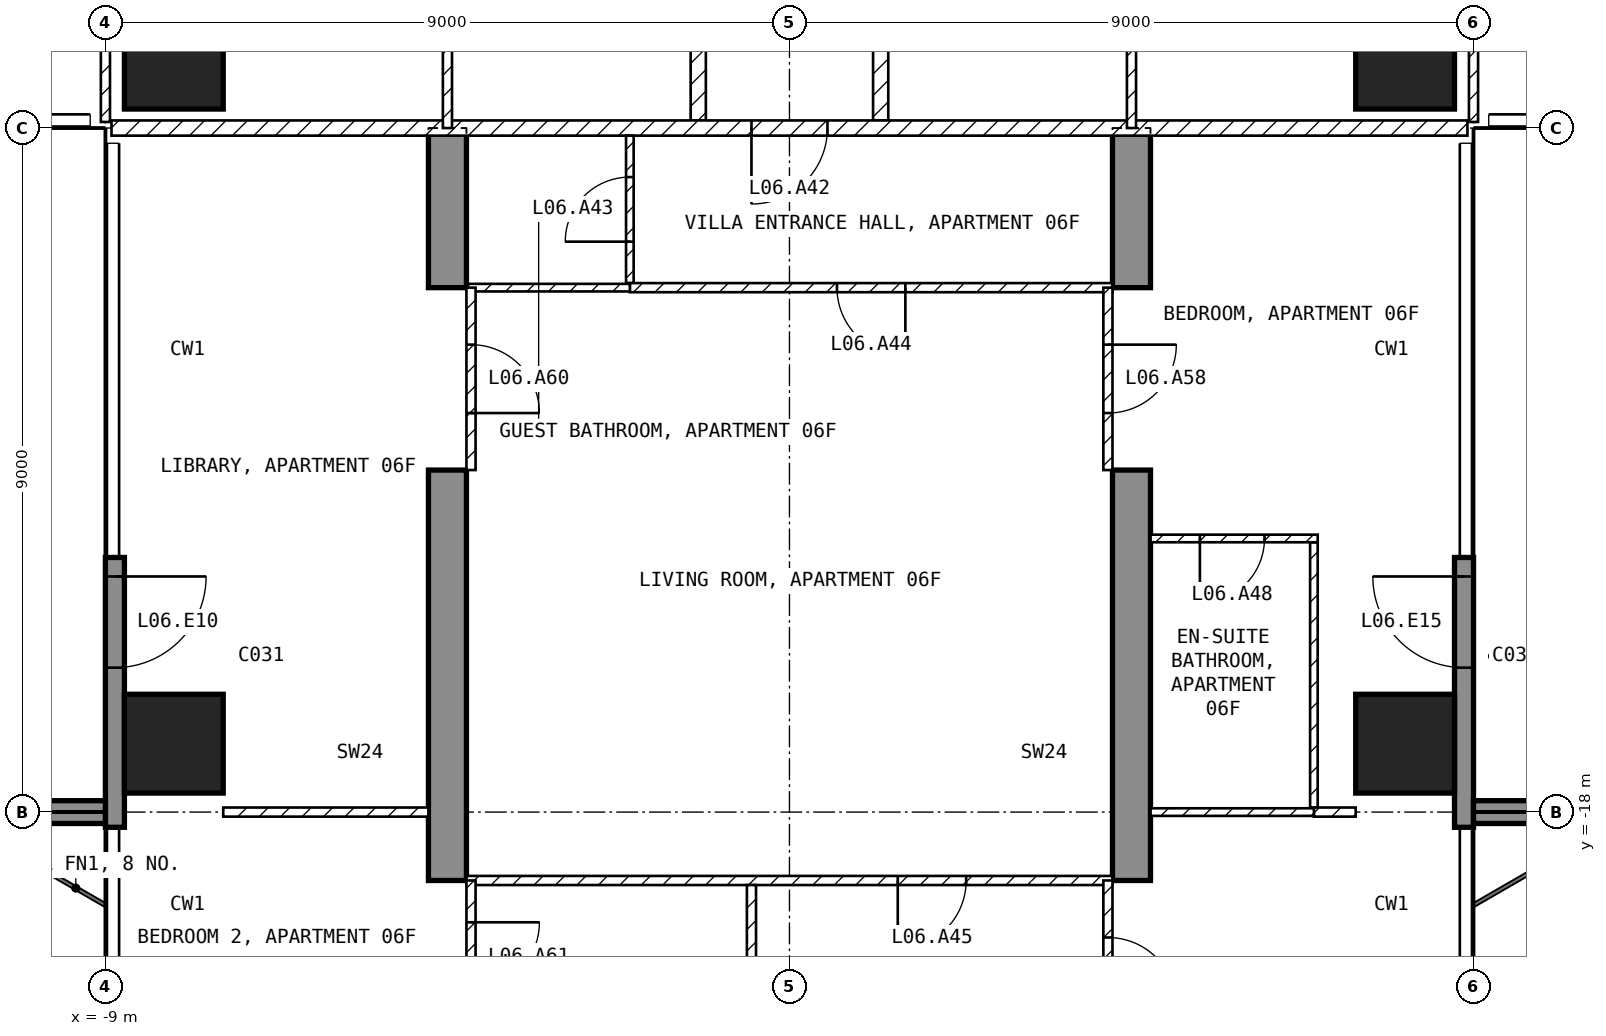
"""IFC4 building model, lengths in metres.
Left out: names, types, materials, properties, quantities, classifications, styles, units other than length and angle.
Written with IfcOpenShell. Run it as: python <this file> out.ifc"""

import sys

from ifc_helpers import new_model, si_unit, direction, frame, frame_2d, origin, origin_2d, place, context, subcontext, project, spatial, polyline, rectangle, outline, extrude, element, fill, save


model = new_model("IFC4")
c1 = context("Model", 3, precision=1e-05, world=origin(), true_north=direction((0.0, 1.0)))
c2 = subcontext(c1, "Body", "Model", "MODEL_VIEW")
j1 = project(units=[si_unit("LENGTHUNIT", "METRE"), si_unit("PLANEANGLEUNIT", "RADIAN")], contexts=[c1])
p1 = place(None, origin())
s1 = spatial("IfcSite", under=j1, at=p1, CompositionType="ELEMENT")
p2 = place(p1, origin())
s2 = spatial("IfcBuilding", under=s1, at=p2, CompositionType="ELEMENT")
p3 = place(p2, frame((0.0, 0.0, 40.0)))
s3 = spatial("IfcBuildingStorey", under=s2, at=p3, CompositionType="ELEMENT", Elevation=40.0)
for number, where, z_axis, x_axis in (
    (1, (-8.1, -17.1, -0.25), (0.0, 0.0, 1.0), (1.0, 0.0, 0.0)),
    (2, (-8.1, -8.1, -0.25), (0.0, 0.0, 1.0), (1.0, 0.0, 0.0)),
    (3, (8.1, -17.1, -0.25), (0.0, 0.0, 1.0), (1.0, 0.0, 0.0)),
    (4, (8.1, -8.1, -0.25), (0.0, 0.0, 1.0), (1.0, 0.0, 0.0)),
):
    element("IfcColumn", number, at=place(p3, frame(where, z_axis=z_axis, x_axis=x_axis)), inside=s3, PredefinedType="COLUMN", context=c2, shape_type="SweptSolid", body=[
        extrude(rectangle(XDim=1.3, YDim=1.3, at=origin_2d()), origin(), (0.0, 0.0, 1.0), 3.5),
    ])
for number, where, z_axis, x_axis in (
    (5, (-4.75, -25.45, -0.25), (1.0, 0.0, 0.0), (0.0, 1.0, 0.0)),
    (6, (4.25, -25.45, -0.25), (1.0, 0.0, 0.0), (0.0, 1.0, 0.0)),
):
    element("IfcWall", number, at=place(p3, frame(where, z_axis=z_axis, x_axis=x_axis)), inside=s3, PredefinedType="SHEAR", context=c2, shape_type="SweptSolid", body=[
        extrude(outline(polyline([(0.0, 0.0), (4.15, 0.0), (4.15, 2.65), (6.55, 2.65), (6.55, 0.0), (11.95, 0.0), (11.95, 2.65), (14.35, 2.65), (14.35, 0.0), (16.45, 0.0), (16.45, 3.5), (0.0, 3.5), (0.0, 0.0)])), origin(), (0.0, 0.0, 1.0), 0.5),
    ])
p4 = place(p3, frame((-8.875, -14.65, 0.0), z_axis=(0.0, 0.0, 1.0), x_axis=(0.0, -1.0, 0.0)))
e7 = element("IfcWall", 7, at=p4, inside=s3, PredefinedType="SOLIDWALL", context=c2, shape_type="SweptSolid", body=[
    extrude(rectangle(XDim=3.55, YDim=0.25, at=frame_2d((1.775, 0.0))), origin(), (0.0, 0.0, 1.0), 3.25),
])
p5 = place(p4, frame((0.25, 0.0, 0.0)))
e8 = element("IfcOpeningElement", 8, at=p5, cuts=e7, PredefinedType="OPENING", context=c2, shape_type="SweptSolid", body=[
    extrude(rectangle(XDim=1.2, YDim=2.4, at=frame_2d((0.6, 1.2))), frame((0.0, 0.135, 0.0), z_axis=(0.0, -1.0, 0.0), x_axis=(1.0, 0.0, 0.0)), (0.0, 0.0, 1.0), 0.27),
])
p6 = place(p3, frame((8.875, -18.2, 0.0), z_axis=(0.0, 0.0, 1.0), x_axis=(0.0, 1.0, 0.0)))
e9 = element("IfcWall", 9, at=p6, inside=s3, PredefinedType="SOLIDWALL", context=c2, shape_type="SweptSolid", body=[
    extrude(rectangle(XDim=3.55, YDim=0.25, at=frame_2d((1.775, 0.0))), origin(), (0.0, 0.0, 1.0), 3.25),
])
p7 = place(p6, frame((2.1, 0.0, 0.0)))
e10 = element("IfcOpeningElement", 10, at=p7, cuts=e9, PredefinedType="OPENING", context=c2, shape_type="SweptSolid", body=[
    extrude(rectangle(XDim=1.2, YDim=2.4, at=frame_2d((0.6, 1.2))), frame((0.0, 0.135, 0.0), z_axis=(0.0, -1.0, 0.0), x_axis=(1.0, 0.0, 0.0)), (0.0, 0.0, 1.0), 0.27),
])
for number, where, z_axis, x_axis in (
    (11, (-9.0, -18.0, 0.0), (0.0, 0.0, 1.0), (-1.0, 0.0, 0.0)),
    (12, (9.0, -18.0, 0.0), (0.0, 0.0, 1.0), (1.0, 0.0, 0.0)),
):
    element("IfcWall", number, at=place(p3, frame(where, z_axis=z_axis, x_axis=x_axis)), inside=s3, PredefinedType="SOLIDWALL", context=c2, shape_type="SweptSolid", body=[
        extrude(rectangle(XDim=2.7, YDim=0.3, at=frame_2d((1.35, 0.0))), origin(), (0.0, 0.0, 1.0), 3.25),
    ])
for number, where, z_axis, x_axis in (
    (13, (1.2, -1.3, 0.0), (0.0, 0.0, 1.0), (0.0, -1.0, 0.0)),
    (14, (-1.2, -8.9, 0.0), (0.0, 0.0, 1.0), (0.0, 1.0, 0.0)),
):
    element("IfcWall", number, at=place(p3, frame(where, z_axis=z_axis, x_axis=x_axis)), inside=s3, PredefinedType="PARTITIONING", context=c2, shape_type="SweptSolid", body=[
        extrude(rectangle(XDim=7.6, YDim=0.2, at=frame_2d((3.8, 0.0))), origin(), (0.0, 0.0, 1.0), 3.25),
    ])
p8 = place(p3, frame((8.92, -9.0, 0.0), z_axis=(0.0, 0.0, 1.0), x_axis=(-1.0, 0.0, 0.0)))
e15 = element("IfcWall", 15, at=p8, inside=s3, PredefinedType="PARTITIONING", context=c2, shape_type="SweptSolid", body=[
    extrude(rectangle(XDim=17.84, YDim=0.2, at=frame_2d((8.92, 0.0))), origin(), (0.0, 0.0, 1.0), 3.25),
])
p9 = place(p8, frame((8.42, 0.0, 0.0)))
e16 = element("IfcOpeningElement", 16, at=p9, cuts=e15, PredefinedType="OPENING", context=c2, shape_type="SweptSolid", body=[
    extrude(rectangle(XDim=1.0, YDim=2.1, at=frame_2d((0.5, 1.05))), frame((0.0, 0.11, 0.0), z_axis=(0.0, -1.0, 0.0), x_axis=(1.0, 0.0, 0.0)), (0.0, 0.0, 1.0), 0.22),
])
p10 = place(p3, frame((9.0, -8.92, 0.0), z_axis=(0.0, 0.0, 1.0), x_axis=(0.0, 1.0, 0.0)))
e17 = element("IfcWall", 17, at=p10, inside=s3, PredefinedType="PARTITIONING", context=c2, shape_type="SweptSolid", body=[
    extrude(rectangle(XDim=7.62, YDim=0.12, at=frame_2d((3.81, 0.0))), origin(), (0.0, 0.0, 1.0), 3.25),
])
p11 = place(p10, frame((2.67, 0.0, 0.0)))
e18 = element("IfcOpeningElement", 18, at=p11, cuts=e17, PredefinedType="OPENING", context=c2, shape_type="SweptSolid", body=[
    extrude(rectangle(XDim=0.9, YDim=2.1, at=frame_2d((0.45, 1.05))), frame((0.0, 0.07, 0.0), z_axis=(0.0, -1.0, 0.0), x_axis=(1.0, 0.0, 0.0)), (0.0, 0.0, 1.0), 0.14),
])
p12 = place(p3, frame((4.5, -9.0, 0.0), z_axis=(0.0, 0.0, 1.0), x_axis=(0.0, 1.0, 0.0)))
e19 = element("IfcWall", 19, at=p12, inside=s3, PredefinedType="PARTITIONING", context=c2, shape_type="SweptSolid", body=[
    extrude(rectangle(XDim=4.68, YDim=0.12, at=frame_2d((2.34, 0.0))), origin(), (0.0, 0.0, 1.0), 3.25),
])
p13 = place(p12, frame((1.89, 0.0, 0.0)))
e20 = element("IfcOpeningElement", 20, at=p13, cuts=e19, PredefinedType="OPENING", context=c2, shape_type="SweptSolid", body=[
    extrude(rectangle(XDim=0.9, YDim=2.1, at=frame_2d((0.45, 1.05))), frame((0.0, 0.07, 0.0), z_axis=(0.0, -1.0, 0.0), x_axis=(1.0, 0.0, 0.0)), (0.0, 0.0, 1.0), 0.14),
])
p14 = place(p3, frame((-9.0, -1.3, 0.0), z_axis=(0.0, 0.0, 1.0), x_axis=(0.0, -1.0, 0.0)))
e21 = element("IfcWall", 21, at=p14, inside=s3, PredefinedType="PARTITIONING", context=c2, shape_type="SweptSolid", body=[
    extrude(rectangle(XDim=7.62, YDim=0.12, at=frame_2d((3.81, 0.0))), origin(), (0.0, 0.0, 1.0), 3.25),
])
p15 = place(p14, frame((1.15, 0.0, 0.0)))
e22 = element("IfcOpeningElement", 22, at=p15, cuts=e21, PredefinedType="OPENING", context=c2, shape_type="SweptSolid", body=[
    extrude(rectangle(XDim=0.9, YDim=2.1, at=frame_2d((0.45, 1.05))), frame((0.0, 0.07, 0.0), z_axis=(0.0, -1.0, 0.0), x_axis=(1.0, 0.0, 0.0)), (0.0, 0.0, 1.0), 0.14),
])
p16 = place(p3, frame((-4.5, -4.32, 0.0), z_axis=(0.0, 0.0, 1.0), x_axis=(0.0, -1.0, 0.0)))
e23 = element("IfcWall", 23, at=p16, inside=s3, PredefinedType="PARTITIONING", context=c2, shape_type="SweptSolid", body=[
    extrude(rectangle(XDim=4.68, YDim=0.12, at=frame_2d((2.34, 0.0))), origin(), (0.0, 0.0, 1.0), 3.25),
])
p17 = place(p16, frame((1.89, 0.0, 0.0)))
e24 = element("IfcOpeningElement", 24, at=p17, cuts=e23, PredefinedType="OPENING", context=c2, shape_type="SweptSolid", body=[
    extrude(rectangle(XDim=0.9, YDim=2.1, at=frame_2d((0.45, 1.05))), frame((0.0, 0.07, 0.0), z_axis=(0.0, -1.0, 0.0), x_axis=(1.0, 0.0, 0.0)), (0.0, 0.0, 1.0), 0.14),
])
p18 = place(p3, frame((-2.1, -11.04, 0.0), z_axis=(0.0, 0.0, 1.0), x_axis=(0.0, 1.0, 0.0)))
e25 = element("IfcWall", 25, at=p18, inside=s3, PredefinedType="PARTITIONING", context=c2, shape_type="SweptSolid", body=[
    extrude(rectangle(XDim=1.94, YDim=0.1, at=frame_2d((0.97, 0.0))), origin(), (0.0, 0.0, 1.0), 3.25),
])
p19 = place(p18, frame((0.545, 0.0, 0.0)))
e26 = element("IfcOpeningElement", 26, at=p19, cuts=e25, PredefinedType="OPENING", context=c2, shape_type="SweptSolid", body=[
    extrude(rectangle(XDim=0.85, YDim=2.1, at=frame_2d((0.425, 1.05))), frame((0.0, 0.06, 0.0), z_axis=(0.0, -1.0, 0.0), x_axis=(1.0, 0.0, 0.0)), (0.0, 0.0, 1.0), 0.12),
])
p20 = place(p3, frame((4.25, -11.1, 0.0), z_axis=(0.0, 0.0, 1.0), x_axis=(-1.0, 0.0, 0.0)))
e27 = element("IfcWall", 27, at=p20, inside=s3, PredefinedType="PARTITIONING", context=c2, shape_type="SweptSolid", body=[
    extrude(rectangle(XDim=6.35, YDim=0.12, at=frame_2d((3.175, 0.0))), origin(), (0.0, 0.0, 1.0), 3.25),
])
p21 = place(p20, frame((2.725, 0.0, 0.0)))
e28 = element("IfcOpeningElement", 28, at=p21, cuts=e27, PredefinedType="OPENING", context=c2, shape_type="SweptSolid", body=[
    extrude(rectangle(XDim=0.9, YDim=2.1, at=frame_2d((0.45, 1.05))), frame((0.0, 0.07, 0.0), z_axis=(0.0, -1.0, 0.0), x_axis=(1.0, 0.0, 0.0)), (0.0, 0.0, 1.0), 0.14),
])
p22 = place(p3, frame((-2.1, -11.1, 0.0), z_axis=(0.0, 0.0, 1.0), x_axis=(-1.0, 0.0, 0.0)))
e29 = element("IfcWall", 29, at=p22, inside=s3, PredefinedType="PARTITIONING", context=c2, shape_type="SweptSolid", body=[
    extrude(rectangle(XDim=2.15, YDim=0.1, at=frame_2d((1.075, 0.0))), origin(), (0.0, 0.0, 1.0), 3.25),
])
p23 = place(p3, frame((4.25, -18.9, 0.0), z_axis=(0.0, 0.0, 1.0), x_axis=(-1.0, 0.0, 0.0)))
e30 = element("IfcWall", 30, at=p23, inside=s3, PredefinedType="PARTITIONING", context=c2, shape_type="SweptSolid", body=[
    extrude(rectangle(XDim=8.5, YDim=0.12, at=frame_2d((4.25, 0.0))), origin(), (0.0, 0.0, 1.0), 3.25),
])
p24 = place(p23, frame((1.925, 0.0, 0.0)))
e31 = element("IfcOpeningElement", 31, at=p24, cuts=e30, PredefinedType="OPENING", context=c2, shape_type="SweptSolid", body=[
    extrude(rectangle(XDim=0.9, YDim=2.1, at=frame_2d((0.45, 1.05))), frame((0.0, 0.07, 0.0), z_axis=(0.0, -1.0, 0.0), x_axis=(1.0, 0.0, 0.0)), (0.0, 0.0, 1.0), 0.14),
])
p25 = place(p3, frame((-0.5, -23.34, 0.0), z_axis=(0.0, 0.0, 1.0), x_axis=(0.0, 1.0, 0.0)))
e32 = element("IfcWall", 32, at=p25, inside=s3, PredefinedType="PARTITIONING", context=c2, shape_type="SweptSolid", body=[
    extrude(rectangle(XDim=4.38, YDim=0.12, at=frame_2d((2.19, 0.0))), origin(), (0.0, 0.0, 1.0), 3.25),
])
p26 = place(p25, frame((1.74, 0.0, 0.0)))
e33 = element("IfcOpeningElement", 33, at=p26, cuts=e32, PredefinedType="OPENING", context=c2, shape_type="SweptSolid", body=[
    extrude(rectangle(XDim=0.9, YDim=2.1, at=frame_2d((0.45, 1.05))), frame((0.0, 0.07, 0.0), z_axis=(0.0, -1.0, 0.0), x_axis=(1.0, 0.0, 0.0)), (0.0, 0.0, 1.0), 0.14),
])
p27 = place(p3, frame((6.9, -17.94, 0.0), z_axis=(0.0, 0.0, 1.0), x_axis=(0.0, 1.0, 0.0)))
e34 = element("IfcWall", 34, at=p27, inside=s3, PredefinedType="PARTITIONING", context=c2, shape_type="SweptSolid", body=[
    extrude(rectangle(XDim=3.49, YDim=0.1, at=frame_2d((1.745, 0.0))), origin(), (0.0, 0.0, 1.0), 3.25),
])
p28 = place(p3, frame((6.95, -14.4, 0.0), z_axis=(0.0, 0.0, 1.0), x_axis=(-1.0, 0.0, 0.0)))
e35 = element("IfcWall", 35, at=p28, inside=s3, PredefinedType="PARTITIONING", context=c2, shape_type="SweptSolid", body=[
    extrude(rectangle(XDim=2.2, YDim=0.1, at=frame_2d((1.1, 0.0))), origin(), (0.0, 0.0, 1.0), 3.25),
])
p29 = place(p28, frame((0.7, 0.0, 0.0)))
e36 = element("IfcOpeningElement", 36, at=p29, cuts=e35, PredefinedType="OPENING", context=c2, shape_type="SweptSolid", body=[
    extrude(rectangle(XDim=0.85, YDim=2.1, at=frame_2d((0.425, 1.05))), frame((0.0, 0.06, 0.0), z_axis=(0.0, -1.0, 0.0), x_axis=(1.0, 0.0, 0.0)), (0.0, 0.0, 1.0), 0.12),
])
p30 = place(p3, frame((7.45, -18.0, 0.0), z_axis=(0.0, 0.0, 1.0), x_axis=(-1.0, 0.0, 0.0)))
e37 = element("IfcWall", 37, at=p30, inside=s3, PredefinedType="PARTITIONING", context=c2, shape_type="SweptSolid", body=[
    extrude(rectangle(XDim=0.55, YDim=0.12, at=frame_2d((0.275, 0.0))), origin(), (0.0, 0.0, 1.0), 3.25),
])
p31 = place(p3, frame((6.9, -18.0, 0.0), z_axis=(0.0, 0.0, 1.0), x_axis=(-1.0, 0.0, 0.0)))
e38 = element("IfcWall", 38, at=p31, inside=s3, PredefinedType="PARTITIONING", context=c2, shape_type="SweptSolid", body=[
    extrude(rectangle(XDim=2.15, YDim=0.1, at=frame_2d((1.075, 0.0))), origin(), (0.0, 0.0, 1.0), 3.25),
])
p32 = place(p3, frame((-4.75, -18.0, 0.0), z_axis=(0.0, 0.0, 1.0), x_axis=(-1.0, 0.0, 0.0)))
e39 = element("IfcWall", 39, at=p32, inside=s3, PredefinedType="PARTITIONING", context=c2, shape_type="SweptSolid", body=[
    extrude(rectangle(XDim=2.7, YDim=0.12, at=frame_2d((1.35, 0.0))), origin(), (0.0, 0.0, 1.0), 3.25),
])
p33 = place(p3, frame((4.19, -11.1, 0.0), z_axis=(0.0, 0.0, 1.0), x_axis=(0.0, -1.0, 0.0)))
e40 = element("IfcWall", 40, at=p33, inside=s3, PredefinedType="PARTITIONING", context=c2, shape_type="SweptSolid", body=[
    extrude(rectangle(XDim=2.4, YDim=0.12, at=frame_2d((1.2, 0.0))), origin(), (0.0, 0.0, 1.0), 2.4),
])
p34 = place(p33, frame((0.75, 0.0, 0.0)))
e41 = element("IfcOpeningElement", 41, at=p34, cuts=e40, PredefinedType="OPENING", context=c2, shape_type="SweptSolid", body=[
    extrude(rectangle(XDim=0.9, YDim=2.1, at=frame_2d((0.45, 1.05))), frame((0.0, 0.07, 0.0), z_axis=(0.0, -1.0, 0.0), x_axis=(1.0, 0.0, 0.0)), (0.0, 0.0, 1.0), 0.14),
])
p35 = place(p3, frame((4.19, -18.9, 0.0), z_axis=(0.0, 0.0, 1.0), x_axis=(0.0, -1.0, 0.0)))
e42 = element("IfcWall", 42, at=p35, inside=s3, PredefinedType="PARTITIONING", context=c2, shape_type="SweptSolid", body=[
    extrude(rectangle(XDim=2.4, YDim=0.12, at=frame_2d((1.2, 0.0))), origin(), (0.0, 0.0, 1.0), 2.4),
])
p36 = place(p35, frame((0.75, 0.0, 0.0)))
e43 = element("IfcOpeningElement", 43, at=p36, cuts=e42, PredefinedType="OPENING", context=c2, shape_type="SweptSolid", body=[
    extrude(rectangle(XDim=0.9, YDim=2.1, at=frame_2d((0.45, 1.05))), frame((0.0, 0.07, 0.0), z_axis=(0.0, -1.0, 0.0), x_axis=(1.0, 0.0, 0.0)), (0.0, 0.0, 1.0), 0.14),
])
p37 = place(p3, frame((-4.19, -11.1, 0.0), z_axis=(0.0, 0.0, 1.0), x_axis=(0.0, -1.0, 0.0)))
e44 = element("IfcWall", 44, at=p37, inside=s3, PredefinedType="PARTITIONING", context=c2, shape_type="SweptSolid", body=[
    extrude(rectangle(XDim=2.4, YDim=0.12, at=frame_2d((1.2, 0.0))), origin(), (0.0, 0.0, 1.0), 2.4),
])
p38 = place(p37, frame((0.75, 0.0, 0.0)))
e45 = element("IfcOpeningElement", 45, at=p38, cuts=e44, PredefinedType="OPENING", context=c2, shape_type="SweptSolid", body=[
    extrude(rectangle(XDim=0.9, YDim=2.1, at=frame_2d((0.45, 1.05))), frame((0.0, 0.07, 0.0), z_axis=(0.0, -1.0, 0.0), x_axis=(1.0, 0.0, 0.0)), (0.0, 0.0, 1.0), 0.14),
])
p39 = place(p3, frame((-4.19, -18.9, 0.0), z_axis=(0.0, 0.0, 1.0), x_axis=(0.0, -1.0, 0.0)))
e46 = element("IfcWall", 46, at=p39, inside=s3, PredefinedType="PARTITIONING", context=c2, shape_type="SweptSolid", body=[
    extrude(rectangle(XDim=2.4, YDim=0.12, at=frame_2d((1.2, 0.0))), origin(), (0.0, 0.0, 1.0), 2.4),
])
p40 = place(p39, frame((0.55, 0.0, 0.0)))
e47 = element("IfcOpeningElement", 47, at=p40, cuts=e46, PredefinedType="OPENING", context=c2, shape_type="SweptSolid", body=[
    extrude(rectangle(XDim=0.9, YDim=2.1, at=frame_2d((0.45, 1.05))), frame((0.0, 0.07, 0.0), z_axis=(0.0, -1.0, 0.0), x_axis=(1.0, 0.0, 0.0)), (0.0, 0.0, 1.0), 0.14),
])
p41 = place(p5, origin())
e48 = element("IfcDoor", 48, at=p41, inside=s3, OperationType="SINGLE_SWING_LEFT", PredefinedType="DOOR", context=c2, shape_type="SweptSolid", body=[
    extrude(rectangle(XDim=1.2, YDim=2.4, at=frame_2d((0.6, 1.2))), frame((0.0, 0.025, 0.0), z_axis=(0.0, -1.0, 0.0), x_axis=(1.0, 0.0, 0.0)), (0.0, 0.0, 1.0), 0.05),
])
fill(e8, e48)
p42 = place(p7, origin())
e49 = element("IfcDoor", 49, at=p42, inside=s3, OperationType="SINGLE_SWING_RIGHT", PredefinedType="DOOR", context=c2, shape_type="SweptSolid", body=[
    extrude(rectangle(XDim=1.2, YDim=2.4, at=frame_2d((0.6, 1.2))), frame((0.0, 0.025, 0.0), z_axis=(0.0, -1.0, 0.0), x_axis=(1.0, 0.0, 0.0)), (0.0, 0.0, 1.0), 0.05),
])
fill(e10, e49)
p43 = place(p9, origin())
e50 = element("IfcDoor", 50, at=p43, inside=s3, OperationType="SINGLE_SWING_RIGHT", PredefinedType="DOOR", context=c2, shape_type="SweptSolid", body=[
    extrude(rectangle(XDim=1.0, YDim=2.1, at=frame_2d((0.5, 1.05))), frame((0.0, 0.025, 0.0), z_axis=(0.0, -1.0, 0.0), x_axis=(1.0, 0.0, 0.0)), (0.0, 0.0, 1.0), 0.05),
])
fill(e16, e50)
p44 = place(p19, origin())
e51 = element("IfcDoor", 51, at=p44, inside=s3, OperationType="SINGLE_SWING_LEFT", PredefinedType="DOOR", context=c2, shape_type="SweptSolid", body=[
    extrude(rectangle(XDim=0.85, YDim=2.1, at=frame_2d((0.425, 1.05))), frame((0.0, 0.025, 0.0), z_axis=(0.0, -1.0, 0.0), x_axis=(1.0, 0.0, 0.0)), (0.0, 0.0, 1.0), 0.05),
])
fill(e26, e51)
p45 = place(p21, origin())
e52 = element("IfcDoor", 52, at=p45, inside=s3, OperationType="SINGLE_SWING_LEFT", PredefinedType="DOOR", context=c2, shape_type="SweptSolid", body=[
    extrude(rectangle(XDim=0.9, YDim=2.1, at=frame_2d((0.45, 1.05))), frame((0.0, 0.025, 0.0), z_axis=(0.0, -1.0, 0.0), x_axis=(1.0, 0.0, 0.0)), (0.0, 0.0, 1.0), 0.05),
])
fill(e28, e52)
p46 = place(p24, origin())
e53 = element("IfcDoor", 53, at=p46, inside=s3, OperationType="SINGLE_SWING_RIGHT", PredefinedType="DOOR", context=c2, shape_type="SweptSolid", body=[
    extrude(rectangle(XDim=0.9, YDim=2.1, at=frame_2d((0.45, 1.05))), frame((0.0, 0.025, 0.0), z_axis=(0.0, -1.0, 0.0), x_axis=(1.0, 0.0, 0.0)), (0.0, 0.0, 1.0), 0.05),
])
fill(e31, e53)
p47 = place(p29, origin())
e54 = element("IfcDoor", 54, at=p47, inside=s3, OperationType="SINGLE_SWING_RIGHT", PredefinedType="DOOR", context=c2, shape_type="SweptSolid", body=[
    extrude(rectangle(XDim=0.85, YDim=2.1, at=frame_2d((0.425, 1.05))), frame((0.0, 0.025, 0.0), z_axis=(0.0, -1.0, 0.0), x_axis=(1.0, 0.0, 0.0)), (0.0, 0.0, 1.0), 0.05),
])
fill(e36, e54)
p48 = place(p34, origin())
e55 = element("IfcDoor", 55, at=p48, inside=s3, OperationType="SINGLE_SWING_LEFT", PredefinedType="DOOR", context=c2, shape_type="SweptSolid", body=[
    extrude(rectangle(XDim=0.9, YDim=2.1, at=frame_2d((0.45, 1.05))), frame((0.0, 0.025, 0.0), z_axis=(0.0, -1.0, 0.0), x_axis=(1.0, 0.0, 0.0)), (0.0, 0.0, 1.0), 0.05),
])
fill(e41, e55)
p49 = place(p36, origin())
e56 = element("IfcDoor", 56, at=p49, inside=s3, OperationType="SINGLE_SWING_RIGHT", PredefinedType="DOOR", context=c2, shape_type="SweptSolid", body=[
    extrude(rectangle(XDim=0.9, YDim=2.1, at=frame_2d((0.45, 1.05))), frame((0.0, 0.025, 0.0), z_axis=(0.0, -1.0, 0.0), x_axis=(1.0, 0.0, 0.0)), (0.0, 0.0, 1.0), 0.05),
])
fill(e43, e56)
p50 = place(p38, origin())
e57 = element("IfcDoor", 57, at=p50, inside=s3, OperationType="SINGLE_SWING_RIGHT", PredefinedType="DOOR", context=c2, shape_type="SweptSolid", body=[
    extrude(rectangle(XDim=0.9, YDim=2.1, at=frame_2d((0.45, 1.05))), frame((0.0, 0.025, 0.0), z_axis=(0.0, -1.0, 0.0), x_axis=(1.0, 0.0, 0.0)), (0.0, 0.0, 1.0), 0.05),
])
fill(e45, e57)
p51 = place(p40, origin())
e58 = element("IfcDoor", 58, at=p51, inside=s3, OperationType="SINGLE_SWING_LEFT", PredefinedType="DOOR", context=c2, shape_type="SweptSolid", body=[
    extrude(rectangle(XDim=0.9, YDim=2.1, at=frame_2d((0.45, 1.05))), frame((0.0, 0.025, 0.0), z_axis=(0.0, -1.0, 0.0), x_axis=(1.0, 0.0, 0.0)), (0.0, 0.0, 1.0), 0.05),
])
fill(e47, e58)
save(model, sys.argv[1])
